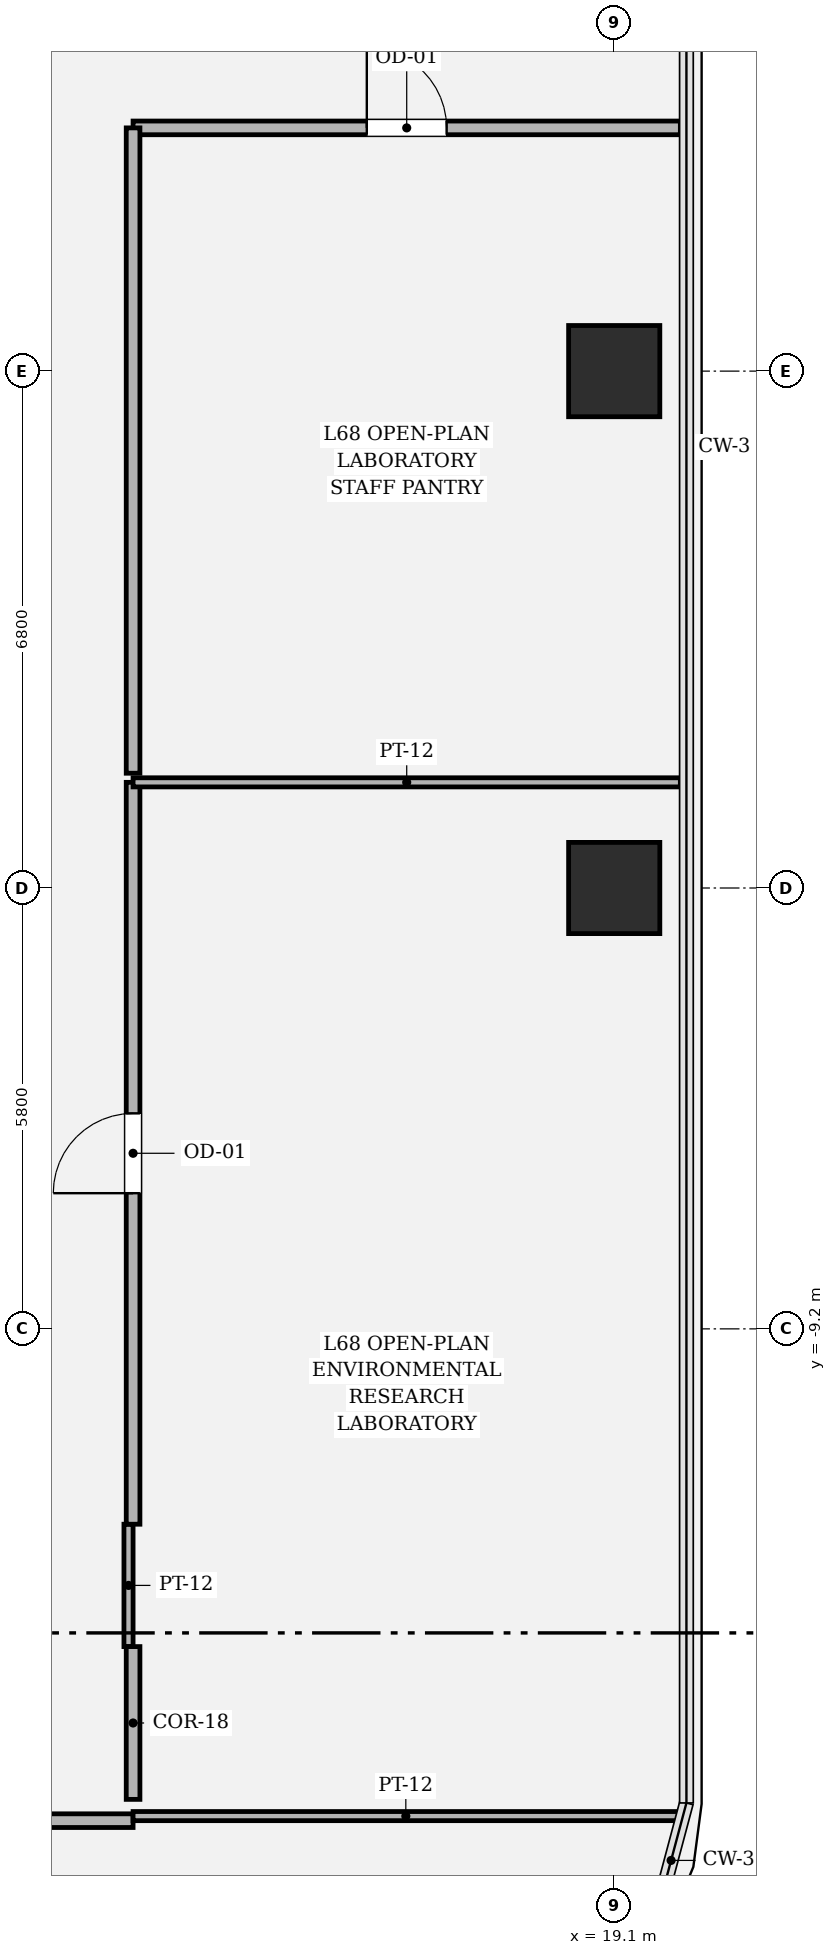
"""IFC4 building model, lengths in metres.
Left out: names, types, materials, properties, quantities, classifications, styles, units other than length and angle.
Written with IfcOpenShell. Run it as: python <this file> out.ifc"""

import sys

from ifc_helpers import new_model, si_unit, direction, frame, frame_2d, origin, origin_2d, place, context, subcontext, project, spatial, rectangle, hollow_rectangle, extrude, element, fill, save


model = new_model("IFC4")
c1 = context("Model", 3, precision=1e-05, world=origin(), true_north=direction((0.0, 1.0)))
c2 = subcontext(c1, "Body", "Model", "MODEL_VIEW")
j1 = project(units=[si_unit("LENGTHUNIT", "METRE"), si_unit("PLANEANGLEUNIT", "RADIAN")], contexts=[c1])
p1 = place(None, origin())
s1 = spatial("IfcSite", under=j1, at=p1, CompositionType="ELEMENT")
p2 = place(p1, origin())
s2 = spatial("IfcBuilding", under=s1, at=p2, CompositionType="ELEMENT")
p3 = place(p2, frame((0.0, 0.0, 288.0)))
s3 = spatial("IfcBuildingStorey", under=s2, at=p3, CompositionType="ELEMENT", Elevation=288.0)
for number, where, z_axis, x_axis in (
    (1, (19.1, -3.4, 0.0), (0.0, 0.0, 1.0), (1.0, 0.0, 0.0)),
    (2, (19.1, 3.4, 0.0), (0.0, 0.0, 1.0), (1.0, 0.0, 0.0)),
):
    element("IfcColumn", number, at=place(p3, frame(where, z_axis=z_axis, x_axis=x_axis)), inside=s3, PredefinedType="COLUMN", context=c2, shape_type="SweptSolid", body=[
        extrude(hollow_rectangle(XDim=1.2, YDim=1.2, WallThickness=0.035, at=origin_2d()), origin(), (0.0, 0.0, 1.0), 4.2),
    ])
p4 = place(p3, frame((0.438, -15.67, 0.0), z_axis=(0.0, 0.0, 1.0), x_axis=(1.0, 0.0, 0.0)))
e3 = element("IfcWall", 3, at=p4, inside=s3, PredefinedType="PARTITIONING", context=c2, shape_type="SweptSolid", body=[
    extrude(rectangle(XDim=12.332, YDim=0.18, at=frame_2d((6.166, 0.0))), origin(), (0.0, 0.0, 1.0), 3.394),
])
p5 = place(p4, frame((5.641, 0.0, 0.0)))
e4 = element("IfcOpeningElement", 4, at=p5, cuts=e3, PredefinedType="OPENING", context=c2, shape_type="SweptSolid", body=[
    extrude(rectangle(XDim=1.05, YDim=2.2, at=frame_2d((0.525, 1.1))), frame((0.0, 0.1, 0.0), z_axis=(0.0, -1.0, 0.0), x_axis=(1.0, 0.0, 0.0)), (0.0, 0.0, 1.0), 0.2),
])
p6 = place(p3, frame((12.77, -15.61, 0.0), z_axis=(0.0, 0.0, 1.0), x_axis=(1.0, 0.0, 0.0)))
e5 = element("IfcWall", 5, at=p6, inside=s3, PredefinedType="PARTITIONING", context=c2, shape_type="SweptSolid", body=[
    extrude(rectangle(XDim=7.177, YDim=0.12, at=frame_2d((3.588, 0.0))), origin(), (0.0, 0.0, 1.0), 3.394),
])
p7 = place(p3, frame((12.71, -13.38, 0.0), z_axis=(0.0, 0.0, 1.0), x_axis=(0.0, 1.0, 0.0)))
e6 = element("IfcWall", 6, at=p7, inside=s3, PredefinedType="PARTITIONING", context=c2, shape_type="SweptSolid", body=[
    extrude(rectangle(XDim=1.61, YDim=0.12, at=frame_2d((0.805, 0.0))), origin(), (0.0, 0.0, 1.0), 3.634),
])
p8 = place(p3, frame((12.77, -11.77, 0.0), z_axis=(0.0, 0.0, 1.0), x_axis=(0.0, 1.0, 0.0)))
e7 = element("IfcWall", 7, at=p8, inside=s3, PredefinedType="PARTITIONING", context=c2, shape_type="SweptSolid", body=[
    extrude(rectangle(XDim=9.76, YDim=0.18, at=frame_2d((4.88, 0.0))), origin(), (0.0, 0.0, 1.0), 3.394),
])
p9 = place(p8, frame((4.355, 0.0, 0.0)))
e8 = element("IfcOpeningElement", 8, at=p9, cuts=e7, PredefinedType="OPENING", context=c2, shape_type="SweptSolid", body=[
    extrude(rectangle(XDim=1.05, YDim=2.2, at=frame_2d((0.525, 1.1))), frame((0.0, 0.1, 0.0), z_axis=(0.0, -1.0, 0.0), x_axis=(1.0, 0.0, 0.0)), (0.0, 0.0, 1.0), 0.2),
])
p10 = place(p3, frame((12.77, -2.01, 0.0), z_axis=(0.0, 0.0, 1.0), x_axis=(1.0, 0.0, 0.0)))
e9 = element("IfcWall", 9, at=p10, inside=s3, PredefinedType="PARTITIONING", context=c2, shape_type="SweptSolid", body=[
    extrude(rectangle(XDim=7.2, YDim=0.12, at=frame_2d((3.6, 0.0))), origin(), (0.0, 0.0, 1.0), 3.394),
])
p11 = place(p3, frame((12.77, -15.39, 0.0), z_axis=(0.0, 0.0, 1.0), x_axis=(0.0, 1.0, 0.0)))
e10 = element("IfcWall", 10, at=p11, inside=s3, PredefinedType="PARTITIONING", context=c2, shape_type="SweptSolid", body=[
    extrude(rectangle(XDim=2.01, YDim=0.18, at=frame_2d((1.005, 0.0))), origin(), (0.0, 0.0, 1.0), 3.634),
])
p12 = place(p3, frame((12.77, 6.6, 0.0), z_axis=(0.0, 0.0, 1.0), x_axis=(1.0, 0.0, 0.0)))
e11 = element("IfcWall", 11, at=p12, inside=s3, PredefinedType="PARTITIONING", context=c2, shape_type="SweptSolid", body=[
    extrude(rectangle(XDim=7.2, YDim=0.18, at=frame_2d((3.6, 0.0))), origin(), (0.0, 0.0, 1.0), 3.394),
])
p13 = place(p12, frame((3.075, 0.0, 0.0)))
e12 = element("IfcOpeningElement", 12, at=p13, cuts=e11, PredefinedType="OPENING", context=c2, shape_type="SweptSolid", body=[
    extrude(rectangle(XDim=1.05, YDim=2.2, at=frame_2d((0.525, 1.1))), frame((0.0, 0.1, 0.0), z_axis=(0.0, -1.0, 0.0), x_axis=(1.0, 0.0, 0.0)), (0.0, 0.0, 1.0), 0.2),
])
p14 = place(p3, frame((12.77, -1.89, 0.0), z_axis=(0.0, 0.0, 1.0), x_axis=(0.0, 1.0, 0.0)))
e13 = element("IfcWall", 13, at=p14, inside=s3, PredefinedType="PARTITIONING", context=c2, shape_type="SweptSolid", body=[
    extrude(rectangle(XDim=8.49, YDim=0.18, at=frame_2d((4.245, 0.0))), origin(), (0.0, 0.0, 1.0), 3.394),
])
p15 = place(p9, origin())
e14 = element("IfcDoor", 14, at=p15, inside=s3, OperationType="SINGLE_SWING_LEFT", PredefinedType="DOOR", context=c2, shape_type="SweptSolid", body=[
    extrude(rectangle(XDim=1.05, YDim=2.2, at=frame_2d((0.525, 1.1))), frame((0.0, 0.025, 0.0), z_axis=(0.0, -1.0, 0.0), x_axis=(1.0, 0.0, 0.0)), (0.0, 0.0, 1.0), 0.05),
])
fill(e8, e14)
p16 = place(p13, origin())
e15 = element("IfcDoor", 15, at=p16, inside=s3, OperationType="SINGLE_SWING_LEFT", PredefinedType="DOOR", context=c2, shape_type="SweptSolid", body=[
    extrude(rectangle(XDim=1.05, YDim=2.2, at=frame_2d((0.525, 1.1))), frame((0.0, 0.025, 0.0), z_axis=(0.0, -1.0, 0.0), x_axis=(1.0, 0.0, 0.0)), (0.0, 0.0, 1.0), 0.05),
])
fill(e12, e15)
save(model, sys.argv[1])
